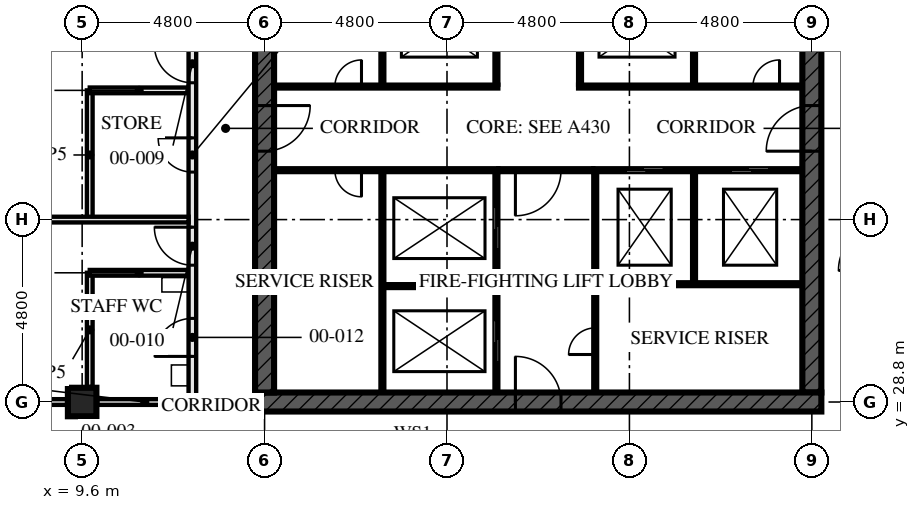
"""IFC4 building model, lengths in metres.
Left out: names, types, materials, properties, quantities, classifications, styles, units other than length and angle.
Written with IfcOpenShell. Run it as: python <this file> out.ifc"""

import sys

from ifc_helpers import new_model, si_unit, direction, frame, frame_2d, origin, origin_2d, place, context, subcontext, project, spatial, rectangle, hollow_rectangle, extrude, element, fill, save


model = new_model("IFC4")
c1 = context("Model", 3, precision=1e-05, world=origin(), true_north=direction((0.0, 1.0)))
c2 = subcontext(c1, "Body", "Model", "MODEL_VIEW")
j1 = project(units=[si_unit("LENGTHUNIT", "METRE"), si_unit("PLANEANGLEUNIT", "RADIAN")], contexts=[c1])
p1 = place(None, origin())
s1 = spatial("IfcSite", under=j1, at=p1, CompositionType="ELEMENT")
p2 = place(p1, origin())
s2 = spatial("IfcBuilding", under=s1, at=p2, CompositionType="ELEMENT")
p3 = place(p2, origin())
s3 = spatial("IfcBuildingStorey", under=s2, at=p3, CompositionType="ELEMENT", Elevation=0.0)
p4 = place(p3, frame((9.6, 28.8, 0.0), z_axis=(0.0, 0.0, 1.0), x_axis=(0.0, 1.0, 0.0)))
e1 = element("IfcColumn", 1, at=p4, inside=s3, PredefinedType="COLUMN", context=c2, shape_type="SweptSolid", body=[
    extrude(hollow_rectangle(XDim=0.75, YDim=0.75, WallThickness=0.08, at=origin_2d()), origin(), (0.0, 0.0, 1.0), 4.5),
])
p5 = place(p3, frame((14.15, 28.8, -1.8), z_axis=(0.0, 0.0, 1.0), x_axis=(1.0, 0.0, 0.0)))
e2 = element("IfcWall", 2, at=p5, inside=s3, PredefinedType="SHEAR", context=c2, shape_type="SweptSolid", body=[
    extrude(rectangle(XDim=14.9, YDim=0.5, at=frame_2d((7.45, 0.0))), origin(), (0.0, 0.0, 1.0), 6.13),
])
p6 = place(p5, frame((6.85, 0.0, 1.8)))
e3 = element("IfcOpeningElement", 3, at=p6, cuts=e2, PredefinedType="OPENING", context=c2, shape_type="SweptSolid", body=[
    extrude(rectangle(XDim=1.2, YDim=2.1, at=frame_2d((0.6, 1.05))), frame((0.0, 0.26, 0.0), z_axis=(0.0, -1.0, 0.0), x_axis=(1.0, 0.0, 0.0)), (0.0, 0.0, 1.0), 0.521),
])
p7 = place(p3, frame((14.4, 42.95, -1.8), z_axis=(0.0, 0.0, 1.0), x_axis=(0.0, -1.0, 0.0)))
e4 = element("IfcWall", 4, at=p7, inside=s3, PredefinedType="SHEAR", context=c2, shape_type="SweptSolid", body=[
    extrude(rectangle(XDim=13.9, YDim=0.5, at=frame_2d((6.95, 0.0))), origin(), (0.0, 0.0, 1.0), 6.13),
])
p8 = place(p7, frame((6.35, 0.0, 1.8)))
e5 = element("IfcOpeningElement", 5, at=p8, cuts=e4, PredefinedType="OPENING", context=c2, shape_type="SweptSolid", body=[
    extrude(rectangle(XDim=1.2, YDim=2.1, at=frame_2d((0.6, 1.05))), frame((0.0, 0.26, 0.0), z_axis=(0.0, -1.0, 0.0), x_axis=(1.0, 0.0, 0.0)), (0.0, 0.0, 1.0), 0.521),
])
p9 = place(p3, frame((28.8, 29.05, -1.8), z_axis=(0.0, 0.0, 1.0), x_axis=(0.0, 1.0, 0.0)))
e6 = element("IfcWall", 6, at=p9, inside=s3, PredefinedType="SHEAR", context=c2, shape_type="SweptSolid", body=[
    extrude(rectangle(XDim=13.9, YDim=0.5, at=frame_2d((6.95, 0.0))), origin(), (0.0, 0.0, 1.0), 6.13),
])
p10 = place(p9, frame((6.35, 0.0, 1.8)))
e7 = element("IfcOpeningElement", 7, at=p10, cuts=e6, PredefinedType="OPENING", context=c2, shape_type="SweptSolid", body=[
    extrude(rectangle(XDim=1.2, YDim=2.1, at=frame_2d((0.6, 1.05))), frame((0.0, 0.26, 0.0), z_axis=(0.0, -1.0, 0.0), x_axis=(1.0, 0.0, 0.0)), (0.0, 0.0, 1.0), 0.521),
])
p11 = place(p3, frame((9.8, 37.0, 0.0), z_axis=(0.0, 0.0, 1.0), x_axis=(1.0, 0.0, 0.0)))
e8 = element("IfcWall", 8, at=p11, inside=s3, PredefinedType="PARTITIONING", context=c2, shape_type="SweptSolid", body=[
    extrude(rectangle(XDim=2.6, YDim=0.15, at=frame_2d((1.3, 0.0))), origin(), (0.0, 0.0, 1.0), 4.33),
])
p12 = place(p3, frame((9.8, 37.0, 0.0), z_axis=(0.0, 0.0, 1.0), x_axis=(0.0, -1.0, 0.0)))
e9 = element("IfcWall", 9, at=p12, inside=s3, PredefinedType="PARTITIONING", context=c2, shape_type="SweptSolid", body=[
    extrude(rectangle(XDim=3.4, YDim=0.15, at=frame_2d((1.7, 0.0))), origin(), (0.0, 0.0, 1.0), 4.33),
])
p13 = place(p3, frame((9.8, 32.2, 0.0), z_axis=(0.0, 0.0, 1.0), x_axis=(1.0, 0.0, 0.0)))
e10 = element("IfcWall", 10, at=p13, inside=s3, PredefinedType="PARTITIONING", context=c2, shape_type="SweptSolid", body=[
    extrude(rectangle(XDim=2.6, YDim=0.15, at=frame_2d((1.3, 0.0))), origin(), (0.0, 0.0, 1.0), 4.33),
])
p14 = place(p3, frame((9.8, 32.2, 0.0), z_axis=(0.0, 0.0, 1.0), x_axis=(0.0, -1.0, 0.0)))
e11 = element("IfcWall", 11, at=p14, inside=s3, PredefinedType="PARTITIONING", context=c2, shape_type="SweptSolid", body=[
    extrude(rectangle(XDim=3.005, YDim=0.15, at=frame_2d((1.502, 0.0))), origin(), (0.0, 0.0, 1.0), 4.33),
])
p15 = place(p3, frame((0.395, 33.6, 0.0), z_axis=(0.0, 0.0, 1.0), x_axis=(1.0, 0.0, 0.0)))
e12 = element("IfcWall", 12, at=p15, inside=s3, PredefinedType="PARTITIONING", context=c2, shape_type="SweptSolid", body=[
    extrude(rectangle(XDim=12.005, YDim=0.15, at=frame_2d((6.002, 0.0))), origin(), (0.0, 0.0, 1.0), 3.55),
])
p16 = place(p3, frame((12.5, 43.2, 0.0), z_axis=(0.0, 0.0, 1.0), x_axis=(0.0, -1.0, 0.0)))
e13 = element("IfcWall", 13, at=p16, inside=s3, PredefinedType="PARTITIONING", context=c2, shape_type="SweptSolid", body=[
    extrude(rectangle(XDim=14.4, YDim=0.2, at=frame_2d((7.2, 0.0))), origin(), (0.0, 0.0, 1.0), 3.55),
])
p17 = place(p16, frame((3.462, 0.0, 0.0)))
e14 = element("IfcOpeningElement", 14, at=p17, cuts=e13, PredefinedType="OPENING", context=c2, shape_type="SweptSolid", body=[
    extrude(rectangle(XDim=1.2, YDim=2.4, at=frame_2d((0.6, 1.2))), frame((0.0, 0.111, 0.0), z_axis=(0.0, -1.0, 0.0), x_axis=(1.0, 0.0, 0.0)), (0.0, 0.0, 1.0), 0.221),
])
p18 = place(p16, frame((5.0, 0.0, 0.0)))
e15 = element("IfcOpeningElement", 15, at=p18, cuts=e13, PredefinedType="OPENING", context=c2, shape_type="SweptSolid", body=[
    extrude(rectangle(XDim=1.0, YDim=2.4, at=frame_2d((0.5, 1.2))), frame((0.0, 0.111, 0.0), z_axis=(0.0, -1.0, 0.0), x_axis=(1.0, 0.0, 0.0)), (0.0, 0.0, 1.0), 0.221),
])
p19 = place(p16, frame((9.8, 0.0, 0.0)))
e16 = element("IfcOpeningElement", 16, at=p19, cuts=e13, PredefinedType="OPENING", context=c2, shape_type="SweptSolid", body=[
    extrude(rectangle(XDim=1.0, YDim=2.4, at=frame_2d((0.5, 1.2))), frame((0.0, 0.111, 0.0), z_axis=(0.0, -1.0, 0.0), x_axis=(1.0, 0.0, 0.0)), (0.0, 0.0, 1.0), 0.221),
])
p20 = place(p16, frame((7.45, 0.0, 0.0)))
e17 = element("IfcOpeningElement", 17, at=p20, cuts=e13, PredefinedType="OPENING", context=c2, shape_type="SweptSolid", body=[
    extrude(rectangle(XDim=0.9, YDim=2.1, at=frame_2d((0.45, 1.05))), frame((0.0, 0.111, 0.0), z_axis=(0.0, -1.0, 0.0), x_axis=(1.0, 0.0, 0.0)), (0.0, 0.0, 1.0), 0.221),
])
p21 = place(p16, frame((12.2, 0.0, 0.0)))
e18 = element("IfcOpeningElement", 18, at=p21, cuts=e13, PredefinedType="OPENING", context=c2, shape_type="SweptSolid", body=[
    extrude(rectangle(XDim=1.0, YDim=2.1, at=frame_2d((0.5, 1.05))), frame((0.0, 0.111, 0.0), z_axis=(0.0, -1.0, 0.0), x_axis=(1.0, 0.0, 0.0)), (0.0, 0.0, 1.0), 0.221),
])
p22 = place(p3, frame((20.5, 29.05, -1.8), z_axis=(0.0, 0.0, 1.0), x_axis=(0.0, 1.0, 0.0)))
e19 = element("IfcWall", 19, at=p22, inside=s3, PredefinedType="SOLIDWALL", context=c2, shape_type="SweptSolid", body=[
    extrude(rectangle(XDim=5.8, YDim=0.1, at=frame_2d((2.9, 0.0))), origin(), (0.0, 0.0, 1.0), 6.13),
])
p23 = place(p22, frame((0.8, 0.0, 1.8)))
e20 = element("IfcOpeningElement", 20, at=p23, cuts=e19, PredefinedType="OPENING", context=c2, shape_type="SweptSolid", body=[
    extrude(rectangle(XDim=1.1, YDim=2.3, at=frame_2d((0.55, 1.15))), frame((0.0, 0.061, 0.0), z_axis=(0.0, -1.0, 0.0), x_axis=(1.0, 0.0, 0.0)), (0.0, 0.0, 1.0), 0.121),
])
p24 = place(p22, frame((3.775, 0.0, 1.8)))
e21 = element("IfcOpeningElement", 21, at=p24, cuts=e19, PredefinedType="OPENING", context=c2, shape_type="SweptSolid", body=[
    extrude(rectangle(XDim=1.1, YDim=2.3, at=frame_2d((0.55, 1.15))), frame((0.0, 0.061, 0.0), z_axis=(0.0, -1.0, 0.0), x_axis=(1.0, 0.0, 0.0)), (0.0, 0.0, 1.0), 0.121),
])
p25 = place(p3, frame((20.5, 37.15, -1.8), z_axis=(0.0, 0.0, 1.0), x_axis=(0.0, 1.0, 0.0)))
e22 = element("IfcWall", 22, at=p25, inside=s3, PredefinedType="SOLIDWALL", context=c2, shape_type="SweptSolid", body=[
    extrude(rectangle(XDim=5.8, YDim=0.1, at=frame_2d((2.9, 0.0))), origin(), (0.0, 0.0, 1.0), 6.13),
])
p26 = place(p25, frame((0.925, 0.0, 1.8)))
e23 = element("IfcOpeningElement", 23, at=p26, cuts=e22, PredefinedType="OPENING", context=c2, shape_type="SweptSolid", body=[
    extrude(rectangle(XDim=1.0, YDim=2.1, at=frame_2d((0.5, 1.05))), frame((0.0, 0.061, 0.0), z_axis=(0.0, -1.0, 0.0), x_axis=(1.0, 0.0, 0.0)), (0.0, 0.0, 1.0), 0.121),
])
p27 = place(p25, frame((3.9, 0.0, 1.8)))
e24 = element("IfcOpeningElement", 24, at=p27, cuts=e22, PredefinedType="OPENING", context=c2, shape_type="SweptSolid", body=[
    extrude(rectangle(XDim=1.0, YDim=2.1, at=frame_2d((0.5, 1.05))), frame((0.0, 0.061, 0.0), z_axis=(0.0, -1.0, 0.0), x_axis=(1.0, 0.0, 0.0)), (0.0, 0.0, 1.0), 0.121),
])
p28 = place(p3, frame((22.7, 37.15, -1.8), z_axis=(0.0, 0.0, 1.0), x_axis=(0.0, 1.0, 0.0)))
e25 = element("IfcWall", 25, at=p28, inside=s3, PredefinedType="SOLIDWALL", context=c2, shape_type="SweptSolid", body=[
    extrude(rectangle(XDim=5.8, YDim=0.1, at=frame_2d((2.9, 0.0))), origin(), (0.0, 0.0, 1.0), 6.13),
])
p29 = place(p28, frame((0.925, 0.0, 1.8)))
e26 = element("IfcOpeningElement", 26, at=p29, cuts=e25, PredefinedType="OPENING", context=c2, shape_type="SweptSolid", body=[
    extrude(rectangle(XDim=1.0, YDim=2.1, at=frame_2d((0.5, 1.05))), frame((0.0, 0.061, 0.0), z_axis=(0.0, -1.0, 0.0), x_axis=(1.0, 0.0, 0.0)), (0.0, 0.0, 1.0), 0.121),
])
p30 = place(p28, frame((3.9, 0.0, 1.8)))
e27 = element("IfcOpeningElement", 27, at=p30, cuts=e25, PredefinedType="OPENING", context=c2, shape_type="SweptSolid", body=[
    extrude(rectangle(XDim=1.0, YDim=2.1, at=frame_2d((0.5, 1.05))), frame((0.0, 0.061, 0.0), z_axis=(0.0, -1.0, 0.0), x_axis=(1.0, 0.0, 0.0)), (0.0, 0.0, 1.0), 0.121),
])
p31 = place(p3, frame((23.1, 29.05, -1.8), z_axis=(0.0, 0.0, 1.0), x_axis=(0.0, 1.0, 0.0)))
e28 = element("IfcWall", 28, at=p31, inside=s3, PredefinedType="SOLIDWALL", context=c2, shape_type="SweptSolid", body=[
    extrude(rectangle(XDim=5.8, YDim=0.1, at=frame_2d((2.9, 0.0))), origin(), (0.0, 0.0, 1.0), 6.13),
])
p32 = place(p31, frame((1.0, 0.0, 1.8)))
e29 = element("IfcOpeningElement", 29, at=p32, cuts=e28, PredefinedType="OPENING", context=c2, shape_type="SweptSolid", body=[
    extrude(rectangle(XDim=0.7, YDim=2.1, at=frame_2d((0.35, 1.05))), frame((0.0, 0.061, 0.0), z_axis=(0.0, -1.0, 0.0), x_axis=(1.0, 0.0, 0.0)), (0.0, 0.0, 1.0), 0.121),
])
p33 = place(p3, frame((14.65, 34.9, -1.8), z_axis=(0.0, 0.0, 1.0), x_axis=(1.0, 0.0, 0.0)))
e30 = element("IfcWall", 30, at=p33, inside=s3, PredefinedType="SOLIDWALL", context=c2, shape_type="SweptSolid", body=[
    extrude(rectangle(XDim=5.9, YDim=0.1, at=frame_2d((2.95, 0.0))), origin(), (0.0, 0.0, 1.0), 6.13),
])
p34 = place(p33, frame((1.6, 0.0, 1.8)))
e31 = element("IfcOpeningElement", 31, at=p34, cuts=e30, PredefinedType="OPENING", context=c2, shape_type="SweptSolid", body=[
    extrude(rectangle(XDim=0.7, YDim=2.1, at=frame_2d((0.35, 1.05))), frame((0.0, 0.061, 0.0), z_axis=(0.0, -1.0, 0.0), x_axis=(1.0, 0.0, 0.0)), (0.0, 0.0, 1.0), 0.121),
])
p35 = place(p3, frame((23.05, 34.9, -1.8), z_axis=(0.0, 0.0, 1.0), x_axis=(1.0, 0.0, 0.0)))
e32 = element("IfcWall", 32, at=p35, inside=s3, PredefinedType="SOLIDWALL", context=c2, shape_type="SweptSolid", body=[
    extrude(rectangle(XDim=5.5, YDim=0.1, at=frame_2d((2.75, 0.0))), origin(), (0.0, 0.0, 1.0), 6.13),
])
p36 = place(p35, frame((0.85, 0.0, 1.8)))
e33 = element("IfcOpeningElement", 33, at=p36, cuts=e32, PredefinedType="OPENING", context=c2, shape_type="SweptSolid", body=[
    extrude(rectangle(XDim=1.0, YDim=2.1, at=frame_2d((0.5, 1.05))), frame((0.0, 0.061, 0.0), z_axis=(0.0, -1.0, 0.0), x_axis=(1.0, 0.0, 0.0)), (0.0, 0.0, 1.0), 0.121),
])
p37 = place(p35, frame((3.625, 0.0, 1.8)))
e34 = element("IfcOpeningElement", 34, at=p37, cuts=e32, PredefinedType="OPENING", context=c2, shape_type="SweptSolid", body=[
    extrude(rectangle(XDim=1.0, YDim=2.1, at=frame_2d((0.5, 1.05))), frame((0.0, 0.061, 0.0), z_axis=(0.0, -1.0, 0.0), x_axis=(1.0, 0.0, 0.0)), (0.0, 0.0, 1.0), 0.121),
])
p38 = place(p3, frame((14.65, 37.1, -1.8), z_axis=(0.0, 0.0, 1.0), x_axis=(1.0, 0.0, 0.0)))
e35 = element("IfcWall", 35, at=p38, inside=s3, PredefinedType="SOLIDWALL", context=c2, shape_type="SweptSolid", body=[
    extrude(rectangle(XDim=5.9, YDim=0.1, at=frame_2d((2.95, 0.0))), origin(), (0.0, 0.0, 1.0), 6.13),
])
p39 = place(p38, frame((1.6, 0.0, 1.8)))
e36 = element("IfcOpeningElement", 36, at=p39, cuts=e35, PredefinedType="OPENING", context=c2, shape_type="SweptSolid", body=[
    extrude(rectangle(XDim=0.7, YDim=2.1, at=frame_2d((0.35, 1.05))), frame((0.0, 0.061, 0.0), z_axis=(0.0, -1.0, 0.0), x_axis=(1.0, 0.0, 0.0)), (0.0, 0.0, 1.0), 0.121),
])
p40 = place(p3, frame((22.65, 37.1, -1.8), z_axis=(0.0, 0.0, 1.0), x_axis=(1.0, 0.0, 0.0)))
e37 = element("IfcWall", 37, at=p40, inside=s3, PredefinedType="SOLIDWALL", context=c2, shape_type="SweptSolid", body=[
    extrude(rectangle(XDim=5.9, YDim=0.1, at=frame_2d((2.95, 0.0))), origin(), (0.0, 0.0, 1.0), 6.13),
])
p41 = place(p40, frame((4.6, 0.0, 1.8)))
e38 = element("IfcOpeningElement", 38, at=p41, cuts=e37, PredefinedType="OPENING", context=c2, shape_type="SweptSolid", body=[
    extrude(rectangle(XDim=0.7, YDim=2.1, at=frame_2d((0.35, 1.05))), frame((0.0, 0.061, 0.0), z_axis=(0.0, -1.0, 0.0), x_axis=(1.0, 0.0, 0.0)), (0.0, 0.0, 1.0), 0.121),
])
p42 = place(p3, frame((20.55, 34.9, -1.8), z_axis=(0.0, 0.0, 1.0), x_axis=(1.0, 0.0, 0.0)))
e39 = element("IfcWall", 39, at=p42, inside=s3, PredefinedType="SOLIDWALL", context=c2, shape_type="SweptSolid", body=[
    extrude(rectangle(XDim=2.5, YDim=0.1, at=frame_2d((1.25, 0.0))), origin(), (0.0, 0.0, 1.0), 6.13),
])
p43 = place(p42, frame((0.45, 0.0, 1.8)))
e40 = element("IfcOpeningElement", 40, at=p43, cuts=e39, PredefinedType="OPENING", context=c2, shape_type="SweptSolid", body=[
    extrude(rectangle(XDim=1.2, YDim=2.1, at=frame_2d((0.6, 1.05))), frame((0.0, 0.061, 0.0), z_axis=(0.0, -1.0, 0.0), x_axis=(1.0, 0.0, 0.0)), (0.0, 0.0, 1.0), 0.121),
])
p44 = place(p3, frame((17.5, 29.05, -1.8), z_axis=(0.0, 0.0, 1.0), x_axis=(0.0, 1.0, 0.0)))
e41 = element("IfcWall", 41, at=p44, inside=s3, PredefinedType="SOLIDWALL", context=c2, shape_type="SweptSolid", body=[
    extrude(rectangle(XDim=5.8, YDim=0.1, at=frame_2d((2.9, 0.0))), origin(), (0.0, 0.0, 1.0), 6.13),
])
p45 = place(p3, frame((17.55, 31.85, -1.8), z_axis=(0.0, 0.0, 1.0), x_axis=(1.0, 0.0, 0.0)))
e42 = element("IfcWall", 42, at=p45, inside=s3, PredefinedType="SOLIDWALL", context=c2, shape_type="SweptSolid", body=[
    extrude(rectangle(XDim=2.9, YDim=0.1, at=frame_2d((1.45, 0.0))), origin(), (0.0, 0.0, 1.0), 6.13),
])
for number, where, z_axis, x_axis in (
    (43, (17.5, 37.15, -1.8), (0.0, 0.0, 1.0), (0.0, 1.0, 0.0)),
    (44, (25.7, 37.15, -1.8), (0.0, 0.0, 1.0), (0.0, 1.0, 0.0)),
):
    element("IfcWall", number, at=place(p3, frame(where, z_axis=z_axis, x_axis=x_axis)), inside=s3, PredefinedType="SOLIDWALL", context=c2, shape_type="SweptSolid", body=[
        extrude(rectangle(XDim=5.8, YDim=0.1, at=frame_2d((2.9, 0.0))), origin(), (0.0, 0.0, 1.0), 6.13),
    ])
p46 = place(p3, frame((25.7, 31.95, -1.8), z_axis=(0.0, 0.0, 1.0), x_axis=(0.0, 1.0, 0.0)))
e45 = element("IfcWall", 45, at=p46, inside=s3, PredefinedType="SOLIDWALL", context=c2, shape_type="SweptSolid", body=[
    extrude(rectangle(XDim=2.9, YDim=0.1, at=frame_2d((1.45, 0.0))), origin(), (0.0, 0.0, 1.0), 6.13),
])
p47 = place(p3, frame((23.15, 31.9, -1.8), z_axis=(0.0, 0.0, 1.0), x_axis=(1.0, 0.0, 0.0)))
e46 = element("IfcWall", 46, at=p47, inside=s3, PredefinedType="SOLIDWALL", context=c2, shape_type="SweptSolid", body=[
    extrude(rectangle(XDim=5.4, YDim=0.1, at=frame_2d((2.7, 0.0))), origin(), (0.0, 0.0, 1.0), 6.13),
])
p48 = place(p3, frame((12.5, 28.8, 0.0), z_axis=(0.0, 0.0, 1.0), x_axis=(-1.0, 0.0, 0.0)))
e47 = element("IfcWall", 47, at=p48, inside=s3, PredefinedType="PARTITIONING", context=c2, shape_type="SweptSolid", body=[
    extrude(rectangle(XDim=2.505, YDim=0.15, at=frame_2d((1.252, 0.0))), origin(), (0.0, 0.0, 1.0), 3.32),
])
p49 = place(p3, frame((9.205, 28.8, 0.0), z_axis=(0.0, 0.0, 1.0), x_axis=(-1.0, 0.0, 0.0)))
e48 = element("IfcWall", 48, at=p49, inside=s3, PredefinedType="PARTITIONING", context=c2, shape_type="SweptSolid", body=[
    extrude(rectangle(XDim=4.01, YDim=0.15, at=frame_2d((2.005, 0.0))), origin(), (0.0, 0.0, 1.0), 3.32),
])
p50 = place(p18, frame((1.0, 0.0, 0.0), z_axis=(0.0, 0.0, 1.0), x_axis=(-1.0, 0.0, 0.0)))
e49 = element("IfcDoor", 49, at=p50, inside=s3, OperationType="SINGLE_SWING_LEFT", PredefinedType="DOOR", context=c2, shape_type="SweptSolid", body=[
    extrude(rectangle(XDim=1.0, YDim=2.4, at=frame_2d((0.5, 1.2))), frame((0.0, 0.027, 0.0), z_axis=(0.0, -1.0, 0.0), x_axis=(1.0, 0.0, 0.0)), (0.0, 0.0, 1.0), 0.054),
])
fill(e15, e49)
p51 = place(p19, frame((1.0, 0.0, 0.0), z_axis=(0.0, 0.0, 1.0), x_axis=(-1.0, 0.0, 0.0)))
e50 = element("IfcDoor", 50, at=p51, inside=s3, OperationType="SINGLE_SWING_LEFT", PredefinedType="DOOR", context=c2, shape_type="SweptSolid", body=[
    extrude(rectangle(XDim=1.0, YDim=2.4, at=frame_2d((0.5, 1.2))), frame((0.0, 0.027, 0.0), z_axis=(0.0, -1.0, 0.0), x_axis=(1.0, 0.0, 0.0)), (0.0, 0.0, 1.0), 0.054),
])
fill(e16, e50)
p52 = place(p20, frame((0.9, 0.0, 0.0), z_axis=(0.0, 0.0, 1.0), x_axis=(-1.0, 0.0, 0.0)))
e51 = element("IfcDoor", 51, at=p52, inside=s3, OperationType="SINGLE_SWING_LEFT", PredefinedType="DOOR", context=c2, shape_type="SweptSolid", body=[
    extrude(rectangle(XDim=0.9, YDim=2.1, at=frame_2d((0.45, 1.05))), frame((0.0, 0.027, 0.0), z_axis=(0.0, -1.0, 0.0), x_axis=(1.0, 0.0, 0.0)), (0.0, 0.0, 1.0), 0.054),
])
fill(e17, e51)
p53 = place(p21, frame((1.0, 0.0, 0.0), z_axis=(0.0, 0.0, 1.0), x_axis=(-1.0, 0.0, 0.0)))
e52 = element("IfcDoor", 52, at=p53, inside=s3, OperationType="SINGLE_SWING_RIGHT", PredefinedType="DOOR", context=c2, shape_type="SweptSolid", body=[
    extrude(rectangle(XDim=1.0, YDim=2.1, at=frame_2d((0.5, 1.05))), frame((0.0, 0.027, 0.0), z_axis=(0.0, -1.0, 0.0), x_axis=(1.0, 0.0, 0.0)), (0.0, 0.0, 1.0), 0.054),
])
fill(e18, e52)
p54 = place(p23, origin())
e53 = element("IfcDoor", 53, at=p54, inside=s3, OperationType="SLIDING_TO_LEFT", PredefinedType="DOOR", context=c2, shape_type="SweptSolid", body=[
    extrude(rectangle(XDim=1.1, YDim=2.3, at=frame_2d((0.55, 1.15))), frame((0.0, 0.05, 0.0), z_axis=(0.0, -1.0, 0.0), x_axis=(1.0, 0.0, 0.0)), (0.0, 0.0, 1.0), 0.1),
])
fill(e20, e53)
p55 = place(p24, origin())
e54 = element("IfcDoor", 54, at=p55, inside=s3, OperationType="SLIDING_TO_LEFT", PredefinedType="DOOR", context=c2, shape_type="SweptSolid", body=[
    extrude(rectangle(XDim=1.1, YDim=2.3, at=frame_2d((0.55, 1.15))), frame((0.0, 0.05, 0.0), z_axis=(0.0, -1.0, 0.0), x_axis=(1.0, 0.0, 0.0)), (0.0, 0.0, 1.0), 0.1),
])
fill(e21, e54)
p56 = place(p32, origin())
e55 = element("IfcDoor", 55, at=p56, inside=s3, OperationType="SINGLE_SWING_RIGHT", PredefinedType="DOOR", context=c2, shape_type="SweptSolid", body=[
    extrude(rectangle(XDim=0.7, YDim=2.1, at=frame_2d((0.35, 1.05))), frame((0.0, 0.027, 0.0), z_axis=(0.0, -1.0, 0.0), x_axis=(1.0, 0.0, 0.0)), (0.0, 0.0, 1.0), 0.054),
])
fill(e29, e55)
p57 = place(p34, frame((0.7, 0.0, 0.0), z_axis=(0.0, 0.0, 1.0), x_axis=(-1.0, 0.0, 0.0)))
e56 = element("IfcDoor", 56, at=p57, inside=s3, OperationType="SINGLE_SWING_RIGHT", PredefinedType="DOOR", context=c2, shape_type="SweptSolid", body=[
    extrude(rectangle(XDim=0.7, YDim=2.1, at=frame_2d((0.35, 1.05))), frame((0.0, 0.027, 0.0), z_axis=(0.0, -1.0, 0.0), x_axis=(1.0, 0.0, 0.0)), (0.0, 0.0, 1.0), 0.054),
])
fill(e31, e56)
p58 = place(p36, origin())
e57 = element("IfcDoor", 57, at=p58, inside=s3, OperationType="SLIDING_TO_LEFT", PredefinedType="DOOR", context=c2, shape_type="SweptSolid", body=[
    extrude(rectangle(XDim=1.0, YDim=2.1, at=frame_2d((0.5, 1.05))), frame((0.0, 0.05, 0.0), z_axis=(0.0, -1.0, 0.0), x_axis=(1.0, 0.0, 0.0)), (0.0, 0.0, 1.0), 0.1),
])
fill(e33, e57)
p59 = place(p37, origin())
e58 = element("IfcDoor", 58, at=p59, inside=s3, OperationType="SLIDING_TO_LEFT", PredefinedType="DOOR", context=c2, shape_type="SweptSolid", body=[
    extrude(rectangle(XDim=1.0, YDim=2.1, at=frame_2d((0.5, 1.05))), frame((0.0, 0.05, 0.0), z_axis=(0.0, -1.0, 0.0), x_axis=(1.0, 0.0, 0.0)), (0.0, 0.0, 1.0), 0.1),
])
fill(e34, e58)
p60 = place(p39, origin())
e59 = element("IfcDoor", 59, at=p60, inside=s3, OperationType="SINGLE_SWING_LEFT", PredefinedType="DOOR", context=c2, shape_type="SweptSolid", body=[
    extrude(rectangle(XDim=0.7, YDim=2.1, at=frame_2d((0.35, 1.05))), frame((0.0, 0.027, 0.0), z_axis=(0.0, -1.0, 0.0), x_axis=(1.0, 0.0, 0.0)), (0.0, 0.0, 1.0), 0.054),
])
fill(e36, e59)
p61 = place(p41, origin())
e60 = element("IfcDoor", 60, at=p61, inside=s3, OperationType="SINGLE_SWING_LEFT", PredefinedType="DOOR", context=c2, shape_type="SweptSolid", body=[
    extrude(rectangle(XDim=0.7, YDim=2.1, at=frame_2d((0.35, 1.05))), frame((0.0, 0.027, 0.0), z_axis=(0.0, -1.0, 0.0), x_axis=(1.0, 0.0, 0.0)), (0.0, 0.0, 1.0), 0.054),
])
fill(e38, e60)
p62 = place(p43, frame((1.2, 0.0, 0.0), z_axis=(0.0, 0.0, 1.0), x_axis=(-1.0, 0.0, 0.0)))
e61 = element("IfcDoor", 61, at=p62, inside=s3, OperationType="SINGLE_SWING_LEFT", PredefinedType="DOOR", context=c2, shape_type="SweptSolid", body=[
    extrude(rectangle(XDim=1.2, YDim=2.1, at=frame_2d((0.6, 1.05))), frame((0.0, 0.027, 0.0), z_axis=(0.0, -1.0, 0.0), x_axis=(1.0, 0.0, 0.0)), (0.0, 0.0, 1.0), 0.054),
])
fill(e40, e61)
p63 = place(p6, origin())
e62 = element("IfcDoor", 62, at=p63, inside=s3, OperationType="SINGLE_SWING_LEFT", PredefinedType="DOOR", context=c2, shape_type="SweptSolid", body=[
    extrude(rectangle(XDim=1.2, YDim=2.1, at=frame_2d((0.6, 1.05))), frame((0.0, 0.027, 0.0), z_axis=(0.0, -1.0, 0.0), x_axis=(1.0, 0.0, 0.0)), (0.0, 0.0, 1.0), 0.054),
])
fill(e3, e62)
p64 = place(p8, origin())
e63 = element("IfcDoor", 63, at=p64, inside=s3, OperationType="SINGLE_SWING_LEFT", PredefinedType="DOOR", context=c2, shape_type="SweptSolid", body=[
    extrude(rectangle(XDim=1.2, YDim=2.1, at=frame_2d((0.6, 1.05))), frame((0.0, 0.027, 0.0), z_axis=(0.0, -1.0, 0.0), x_axis=(1.0, 0.0, 0.0)), (0.0, 0.0, 1.0), 0.054),
])
fill(e5, e63)
p65 = place(p10, origin())
e64 = element("IfcDoor", 64, at=p65, inside=s3, OperationType="SINGLE_SWING_LEFT", PredefinedType="DOOR", context=c2, shape_type="SweptSolid", body=[
    extrude(rectangle(XDim=1.2, YDim=2.1, at=frame_2d((0.6, 1.05))), frame((0.0, 0.027, 0.0), z_axis=(0.0, -1.0, 0.0), x_axis=(1.0, 0.0, 0.0)), (0.0, 0.0, 1.0), 0.054),
])
fill(e7, e64)
save(model, sys.argv[1])
